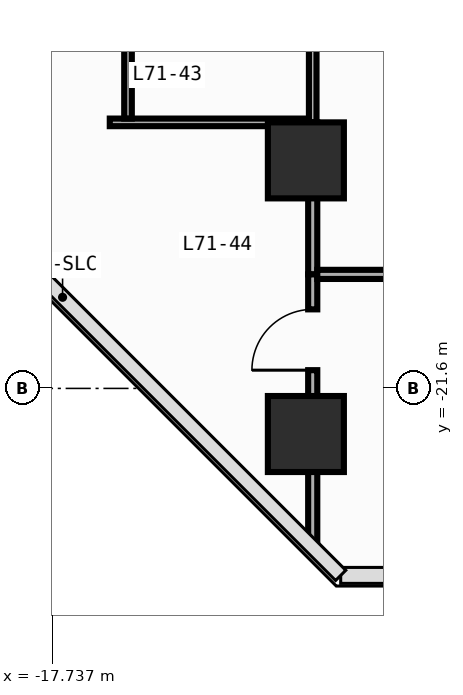
"""IFC4 building model, lengths in metres.
Left out: names, types, materials, properties, quantities, classifications, styles, units other than length and angle.
Written with IfcOpenShell. Run it as: python <this file> out.ifc"""

import sys

from ifc_helpers import new_model, si_unit, direction, frame, frame_2d, origin, origin_2d, place, context, subcontext, project, spatial, rectangle, circle, extrude, element, fill, save


model = new_model("IFC4")
c1 = context("Model", 3, precision=1e-05, world=origin(), true_north=direction((0.0, 1.0)))
c2 = subcontext(c1, "Body", "Model", "MODEL_VIEW")
j1 = project(units=[si_unit("LENGTHUNIT", "METRE"), si_unit("PLANEANGLEUNIT", "RADIAN")], contexts=[c1])
p1 = place(None, origin())
s1 = spatial("IfcSite", under=j1, at=p1, CompositionType="ELEMENT")
p2 = place(p1, origin())
s2 = spatial("IfcBuilding", under=s1, at=p2, CompositionType="ELEMENT")
p3 = place(p2, frame((0.0, 0.0, 296.6)))
s3 = spatial("IfcBuildingStorey", under=s2, at=p3, CompositionType="ELEMENT", Elevation=296.6)
for number, where, z_axis, x_axis in (
    (1, (-14.4, -18.6, 0.0), (0.0, 0.0, 1.0), (1.0, 0.0, 0.0)),
    (2, (-14.4, -22.2, 0.0), (0.0, 0.0, 1.0), (1.0, 0.0, 0.0)),
):
    element("IfcColumn", number, at=place(p3, frame(where, z_axis=z_axis, x_axis=x_axis)), inside=s3, PredefinedType="COLUMN", context=c2, shape_type="SweptSolid", body=[
        extrude(circle(Radius=0.5, at=origin_2d()), origin(), (0.0, 0.0, 1.0), 3.8),
    ])
p4 = place(p3, frame((-16.98, -18.1, 0.0), z_axis=(0.0, 0.0, 1.0), x_axis=(1.0, 0.0, 0.0)))
e3 = element("IfcWall", 3, at=p4, inside=s3, PredefinedType="PARTITIONING", context=c2, shape_type="SweptSolid", body=[
    extrude(rectangle(XDim=2.62, YDim=0.1, at=frame_2d((1.31, 0.0))), origin(), (0.0, 0.0, 1.0), 3.54),
])
p5 = place(p3, frame((-14.31, -18.1, 0.0), z_axis=(0.0, 0.0, 1.0), x_axis=(0.0, 1.0, 0.0)))
e4 = element("IfcWall", 4, at=p5, inside=s3, PredefinedType="PARTITIONING", context=c2, shape_type="SweptSolid", body=[
    extrude(rectangle(XDim=2.5, YDim=0.1, at=frame_2d((1.25, 0.0))), origin(), (0.0, 0.0, 1.0), 2.64),
])
p6 = place(p5, frame((1.24, 0.0, 0.0)))
e5 = element("IfcOpeningElement", 5, at=p6, cuts=e4, PredefinedType="OPENING", context=c2, shape_type="SweptSolid", body=[
    extrude(rectangle(XDim=0.8, YDim=2.1, at=frame_2d((0.4, 1.05))), frame((0.0, 0.06, 0.0), z_axis=(0.0, -1.0, 0.0), x_axis=(1.0, 0.0, 0.0)), (0.0, 0.0, 1.0), 0.12),
])
p7 = place(p3, frame((-14.31, -20.1, 0.0), z_axis=(0.0, 0.0, 1.0), x_axis=(0.0, 1.0, 0.0)))
e6 = element("IfcWall", 6, at=p7, inside=s3, PredefinedType="PARTITIONING", context=c2, shape_type="SweptSolid", body=[
    extrude(rectangle(XDim=2.0, YDim=0.12, at=frame_2d((1.0, 0.0))), origin(), (0.0, 0.0, 1.0), 2.64),
])
p8 = place(p3, frame((-14.31, -23.687, 0.0), z_axis=(0.0, 0.0, 1.0), x_axis=(0.0, 1.0, 0.0)))
e7 = element("IfcWall", 7, at=p8, inside=s3, PredefinedType="PARTITIONING", context=c2, shape_type="SweptSolid", body=[
    extrude(rectangle(XDim=3.587, YDim=0.12, at=frame_2d((1.793, 0.0))), origin(), (0.0, 0.0, 1.0), 2.64),
])
p9 = place(p8, frame((2.327, 0.0, 0.0)))
e8 = element("IfcOpeningElement", 8, at=p9, cuts=e7, PredefinedType="OPENING", context=c2, shape_type="SweptSolid", body=[
    extrude(rectangle(XDim=0.8, YDim=2.1, at=frame_2d((0.4, 1.05))), frame((0.0, 0.07, 0.0), z_axis=(0.0, -1.0, 0.0), x_axis=(1.0, 0.0, 0.0)), (0.0, 0.0, 1.0), 0.14),
])
p10 = place(p3, frame((-14.25, -20.1, 0.0), z_axis=(0.0, 0.0, 1.0), x_axis=(1.0, 0.0, 0.0)))
e9 = element("IfcWall", 9, at=p10, inside=s3, PredefinedType="PARTITIONING", context=c2, shape_type="SweptSolid", body=[
    extrude(rectangle(XDim=6.355, YDim=0.12, at=frame_2d((3.177, 0.0))), origin(), (0.0, 0.0, 1.0), 3.54),
])
p11 = place(p10, frame((2.124, 0.0, 0.0)))
e10 = element("IfcOpeningElement", 10, at=p11, cuts=e9, PredefinedType="OPENING", context=c2, shape_type="SweptSolid", body=[
    extrude(rectangle(XDim=0.86, YDim=2.15, at=frame_2d((0.43, 1.075))), frame((0.0, 0.07, 0.0), z_axis=(0.0, -1.0, 0.0), x_axis=(1.0, 0.0, 0.0)), (0.0, 0.0, 1.0), 0.14),
])
p12 = place(p3, frame((-16.74, -18.05, 0.0), z_axis=(0.0, 0.0, 1.0), x_axis=(0.0, 1.0, 0.0)))
e11 = element("IfcWall", 11, at=p12, inside=s3, PredefinedType="PARTITIONING", context=c2, shape_type="SweptSolid", body=[
    extrude(rectangle(XDim=2.45, YDim=0.1, at=frame_2d((1.225, 0.0))), origin(), (0.0, 0.0, 1.0), 3.54),
])
p13 = place(p9, origin())
e12 = element("IfcDoor", 12, at=p13, inside=s3, OperationType="SINGLE_SWING_LEFT", PredefinedType="DOOR", context=c2, shape_type="SweptSolid", body=[
    extrude(rectangle(XDim=0.8, YDim=2.1, at=frame_2d((0.4, 1.05))), frame((0.0, 0.025, 0.0), z_axis=(0.0, -1.0, 0.0), x_axis=(1.0, 0.0, 0.0)), (0.0, 0.0, 1.0), 0.05),
])
fill(e8, e12)
save(model, sys.argv[1])
